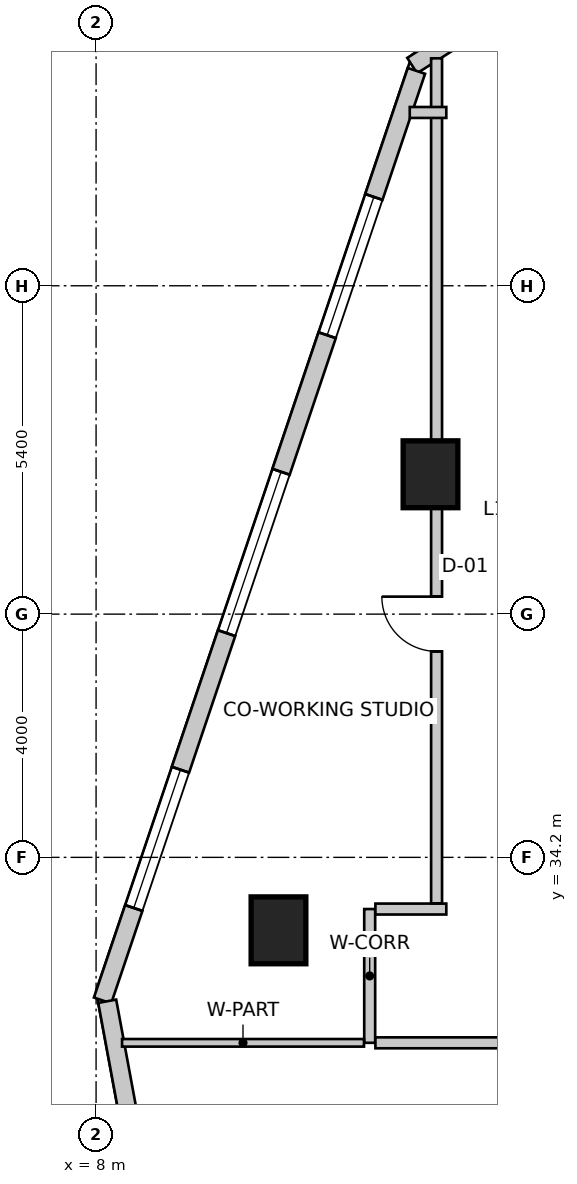
"""IFC4 building model, lengths in metres.
Left out: names, types, materials, properties, quantities, classifications, styles, units other than length and angle.
Written with IfcOpenShell. Run it as: python <this file> out.ifc"""

import sys

from ifc_helpers import new_model, si_unit, direction, frame, frame_2d, origin, origin_2d, place, context, subcontext, project, spatial, rectangle, extrude, source, transform, mapped, element, fill, save


model = new_model("IFC4")
c1 = context("Model", 3, precision=1e-05, world=origin(), true_north=direction((0.0, 1.0)))
c2 = subcontext(c1, "Body", "Model", "MODEL_VIEW")
j1 = project(units=[si_unit("LENGTHUNIT", "METRE"), si_unit("PLANEANGLEUNIT", "RADIAN")], contexts=[c1])
p1 = place(None, origin())
s1 = spatial("IfcSite", under=j1, at=p1, CompositionType="ELEMENT")
p2 = place(p1, origin())
s2 = spatial("IfcBuilding", under=s1, at=p2, CompositionType="ELEMENT")
p3 = place(p2, frame((0.0, 0.0, 47.0)))
s3 = spatial("IfcBuildingStorey", under=s2, at=p3, CompositionType="ELEMENT", Elevation=47.0)
m1 = source(origin(), c2, "Body", "SweptSolid", [
    extrude(rectangle(XDim=0.9, YDim=1.1, at=origin_2d()), origin(), (0.0, 0.0, 1.0), 4.0),
])
for number, where, z_axis, x_axis in (
    (1, (11.0, 33.0, 0.0), (0.0, 0.0, 1.0), (1.0, 0.0, 0.0)),
    (2, (13.5, 40.5, 0.0), (0.0, 0.0, 1.0), (1.0, 0.0, 0.0)),
):
    element("IfcColumn", number, at=place(p3, frame(where, z_axis=z_axis, x_axis=x_axis)), inside=s3, PredefinedType="COLUMN", context=c2, shape_type="MappedRepresentation", body=[
        mapped(m1, transform((0.0, 0.0, 0.0), scale=1.0)),
    ])
p4 = place(p3, frame((21.875, 52.743, 0.0), z_axis=(0.0, 0.0, 1.0), x_axis=(-0.843647802826, -0.536896996441, 0.0)))
e3 = element("IfcWall", 3, at=p4, inside=s3, PredefinedType="SOLIDWALL", context=c2, shape_type="SweptSolid", body=[
    extrude(rectangle(XDim=10.284, YDim=0.3, at=frame_2d((5.142, 0.0))), origin(), (0.0, 0.0, 1.0), 3.75),
])
m2 = source(origin(), c2, "Body", "SweptSolid", [
    extrude(rectangle(XDim=1.2, YDim=1.6, at=frame_2d((0.6, 0.8))), frame((0.0, 0.16, 0.0), z_axis=(0.0, -1.0, 0.0), x_axis=(1.0, 0.0, 0.0)), (0.0, 0.0, 1.0), 0.32),
])
p5 = place(p4, frame((0.479, 0.0, 0.85)))
e4 = element("IfcOpeningElement", 4, at=p5, cuts=e3, PredefinedType="OPENING", context=c2, shape_type="MappedRepresentation", body=[
    mapped(m2, transform((0.0, 0.0, 0.0), scale=1.0)),
])
m3 = source(origin(), c2, "Body", "SweptSolid", [
    extrude(rectangle(XDim=2.8, YDim=2.4, at=frame_2d((1.4, 1.2))), frame((0.0, 0.16, 0.0), z_axis=(0.0, -1.0, 0.0), x_axis=(1.0, 0.0, 0.0)), (0.0, 0.0, 1.0), 0.32),
])
p6 = place(p4, frame((3.342, 0.0, 0.85)))
e5 = element("IfcOpeningElement", 5, at=p6, cuts=e3, PredefinedType="OPENING", context=c2, shape_type="MappedRepresentation", body=[
    mapped(m3, transform((0.0, 0.0, 0.0), scale=1.0)),
])
m4 = source(origin(), c2, "Body", "SweptSolid", [
    extrude(rectangle(XDim=1.8, YDim=2.1, at=frame_2d((0.9, 1.05))), frame((0.0, 0.16, 0.0), z_axis=(0.0, -1.0, 0.0), x_axis=(1.0, 0.0, 0.0)), (0.0, 0.0, 1.0), 0.32),
])
p7 = place(p4, frame((7.754, 0.0, 0.85)))
e6 = element("IfcOpeningElement", 6, at=p7, cuts=e3, PredefinedType="OPENING", context=c2, shape_type="MappedRepresentation", body=[
    mapped(m4, transform((0.0, 0.0, 0.0), scale=1.0)),
])
p8 = place(p3, frame((13.269, 47.134, 0.0), z_axis=(0.0, 0.0, 1.0), x_axis=(-0.319920423265, -0.947444416722, 0.0)))
e7 = element("IfcWall", 7, at=p8, inside=s3, PredefinedType="SOLIDWALL", context=c2, shape_type="SweptSolid", body=[
    extrude(rectangle(XDim=16.135, YDim=0.3, at=frame_2d((8.067, 0.0))), origin(), (0.0, 0.0, 1.0), 3.75),
])
m5 = source(origin(), c2, "Body", "SweptSolid", [
    extrude(rectangle(XDim=2.4, YDim=2.2, at=frame_2d((1.2, 1.1))), frame((0.0, 0.16, 0.0), z_axis=(0.0, -1.0, 0.0), x_axis=(1.0, 0.0, 0.0)), (0.0, 0.0, 1.0), 0.32),
])
p9 = place(p8, frame((2.188, 0.0, 0.85)))
e8 = element("IfcOpeningElement", 8, at=p9, cuts=e7, PredefinedType="OPENING", context=c2, shape_type="MappedRepresentation", body=[
    mapped(m5, transform((0.0, 0.0, 0.0), scale=1.0)),
])
p10 = place(p8, frame((6.959, 0.0, 0.85)))
e9 = element("IfcOpeningElement", 9, at=p10, cuts=e7, PredefinedType="OPENING", context=c2, shape_type="MappedRepresentation", body=[
    mapped(m3, transform((0.0, 0.0, 0.0), scale=1.0)),
])
p11 = place(p8, frame((12.13, 0.0, 0.85)))
e10 = element("IfcOpeningElement", 10, at=p11, cuts=e7, PredefinedType="OPENING", context=c2, shape_type="MappedRepresentation", body=[
    mapped(m5, transform((0.0, 0.0, 0.0), scale=1.0)),
])
p12 = place(p3, frame((8.183, 31.833, 0.0), z_axis=(0.0, 0.0, 1.0), x_axis=(0.18216364648, -0.983268226834, 0.0)))
e11 = element("IfcWall", 11, at=p12, inside=s3, PredefinedType="SOLIDWALL", context=c2, shape_type="SweptSolid", body=[
    extrude(rectangle(XDim=26.678, YDim=0.3, at=frame_2d((13.339, 0.0))), origin(), (0.0, 0.0, 1.0), 3.75),
])
p13 = place(p12, frame((2.952, 0.0, 0.85)))
e12 = element("IfcOpeningElement", 12, at=p13, cuts=e11, PredefinedType="OPENING", context=c2, shape_type="MappedRepresentation", body=[
    mapped(m3, transform((0.0, 0.0, 0.0), scale=1.0)),
])
p14 = place(p12, frame((8.986, 0.0, 0.85)))
e13 = element("IfcOpeningElement", 13, at=p14, cuts=e11, PredefinedType="OPENING", context=c2, shape_type="MappedRepresentation", body=[
    mapped(m3, transform((0.0, 0.0, 0.0), scale=1.0)),
])
p15 = place(p12, frame((13.543, 0.0, 0.85)))
e14 = element("IfcOpeningElement", 14, at=p15, cuts=e11, PredefinedType="OPENING", context=c2, shape_type="MappedRepresentation", body=[
    mapped(m5, transform((0.0, 0.0, 0.0), scale=1.0)),
])
p16 = place(p12, frame((18.211, 0.0, 0.85)))
e15 = element("IfcOpeningElement", 15, at=p16, cuts=e11, PredefinedType="OPENING", context=c2, shape_type="MappedRepresentation", body=[
    mapped(m3, transform((0.0, 0.0, 0.0), scale=1.0)),
])
p17 = place(p12, frame((22.909, 0.0, 0.85)))
e16 = element("IfcOpeningElement", 16, at=p17, cuts=e11, PredefinedType="OPENING", context=c2, shape_type="MappedRepresentation", body=[
    mapped(m5, transform((0.0, 0.0, 0.0), scale=1.0)),
])
p18 = place(p3, frame((12.5, 31.15, 0.0), z_axis=(0.0, 0.0, 1.0), x_axis=(0.0, 1.0, 0.0)))
e17 = element("IfcWall", 17, at=p18, inside=s3, PredefinedType="PARTITIONING", context=c2, shape_type="SweptSolid", body=[
    extrude(rectangle(XDim=2.2, YDim=0.18, at=frame_2d((1.1, 0.0))), origin(), (0.0, 0.0, 1.0), 3.434),
])
p19 = place(p3, frame((12.594, 33.35, 0.0), z_axis=(0.0, 0.0, 1.0), x_axis=(1.0, 0.0, 0.0)))
e18 = element("IfcWall", 18, at=p19, inside=s3, PredefinedType="PARTITIONING", context=c2, shape_type="SweptSolid", body=[
    extrude(rectangle(XDim=1.166, YDim=0.18, at=frame_2d((0.583, 0.0))), origin(), (0.0, 0.0, 1.0), 3.75),
])
p20 = place(p3, frame((17.96, 31.15, 0.0), z_axis=(0.0, 0.0, 1.0), x_axis=(-1.0, 0.0, 0.0)))
e19 = element("IfcWall", 19, at=p20, inside=s3, PredefinedType="PARTITIONING", context=c2, shape_type="SweptSolid", body=[
    extrude(rectangle(XDim=5.366, YDim=0.18, at=frame_2d((2.683, 0.0))), origin(), (0.0, 0.0, 1.0), 3.434),
])
p21 = place(p3, frame((13.6, 33.444, 0.0), z_axis=(0.0, 0.0, 1.0), x_axis=(0.0, 1.0, 0.0)))
e20 = element("IfcWall", 20, at=p21, inside=s3, PredefinedType="PARTITIONING", context=c2, shape_type="SweptSolid", body=[
    extrude(rectangle(XDim=13.896, YDim=0.18, at=frame_2d((6.948, 0.0))), origin(), (0.0, 0.0, 1.0), 2.892),
])
m6 = source(origin(), c2, "Body", "SweptSolid", [
    extrude(rectangle(XDim=0.9, YDim=2.15, at=frame_2d((0.45, 1.075))), frame((0.0, 0.1, 0.0), z_axis=(0.0, -1.0, 0.0), x_axis=(1.0, 0.0, 0.0)), (0.0, 0.0, 1.0), 0.2),
])
p22 = place(p21, frame((4.144, 0.0, 0.0)))
e21 = element("IfcOpeningElement", 21, at=p22, cuts=e20, PredefinedType="OPENING", context=c2, shape_type="MappedRepresentation", body=[
    mapped(m6, transform((0.0, 0.0, 0.0), scale=1.0)),
])
p23 = place(p3, frame((13.76, 46.45, 0.0), z_axis=(0.0, 0.0, 1.0), x_axis=(-1.0, 0.0, 0.0)))
e22 = element("IfcWall", 22, at=p23, inside=s3, PredefinedType="PARTITIONING", context=c2, shape_type="SweptSolid", body=[
    extrude(rectangle(XDim=0.601, YDim=0.18, at=frame_2d((0.301, 0.0))), origin(), (0.0, 0.0, 1.0), 3.75),
])
p24 = place(p3, frame((12.406, 31.15, 0.0), z_axis=(0.0, 0.0, 1.0), x_axis=(-1.0, 0.0, 0.0)))
e23 = element("IfcWall", 23, at=p24, inside=s3, PredefinedType="PARTITIONING", context=c2, shape_type="SweptSolid", body=[
    extrude(rectangle(XDim=3.979, YDim=0.125, at=frame_2d((1.99, 0.0))), origin(), (0.0, 0.0, 1.0), 2.892),
])
m7 = source(origin(), c2, "Body", "SweptSolid", [
    extrude(rectangle(XDim=2.4, YDim=2.2, at=frame_2d((1.2, 1.1))), frame((0.0, -0.015, 0.0), z_axis=(0.0, -1.0, 0.0), x_axis=(1.0, 0.0, 0.0)), (0.0, 0.0, 1.0), 0.06),
])
p25 = place(p9, origin())
e24 = element("IfcWindow", 24, at=p25, inside=s3, PartitioningType="SINGLE_PANEL", PredefinedType="WINDOW", context=c2, shape_type="MappedRepresentation", body=[
    mapped(m7, transform((0.0, 0.0, 0.0), scale=1.0)),
])
fill(e8, e24)
m8 = source(origin(), c2, "Body", "SweptSolid", [
    extrude(rectangle(XDim=2.8, YDim=2.4, at=frame_2d((1.4, 1.2))), frame((0.0, -0.015, 0.0), z_axis=(0.0, -1.0, 0.0), x_axis=(1.0, 0.0, 0.0)), (0.0, 0.0, 1.0), 0.06),
])
p26 = place(p10, origin())
e25 = element("IfcWindow", 25, at=p26, inside=s3, PartitioningType="SINGLE_PANEL", PredefinedType="WINDOW", context=c2, shape_type="MappedRepresentation", body=[
    mapped(m8, transform((0.0, 0.0, 0.0), scale=1.0)),
])
fill(e9, e25)
p27 = place(p11, origin())
e26 = element("IfcWindow", 26, at=p27, inside=s3, PartitioningType="SINGLE_PANEL", PredefinedType="WINDOW", context=c2, shape_type="MappedRepresentation", body=[
    mapped(m7, transform((0.0, 0.0, 0.0), scale=1.0)),
])
fill(e10, e26)
m9 = source(origin(), c2, "Body", "SweptSolid", [
    extrude(rectangle(XDim=0.9, YDim=2.15, at=frame_2d((0.45, 1.075))), frame((0.0, 0.025, 0.0), z_axis=(0.0, -1.0, 0.0), x_axis=(1.0, 0.0, 0.0)), (0.0, 0.0, 1.0), 0.05),
])
p28 = place(p22, origin())
e27 = element("IfcDoor", 27, at=p28, inside=s3, OperationType="SINGLE_SWING_RIGHT", PredefinedType="DOOR", context=c2, shape_type="MappedRepresentation", body=[
    mapped(m9, transform((0.0, 0.0, 0.0), scale=1.0)),
])
fill(e21, e27)
save(model, sys.argv[1])
